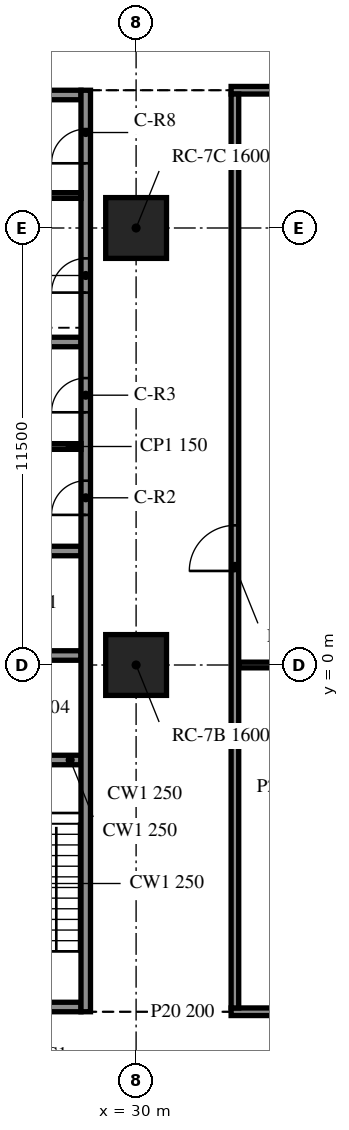
"""IFC4 building model, lengths in metres.
Left out: names, types, materials, properties, quantities, classifications, styles, units other than length and angle.
Written with IfcOpenShell. Run it as: python <this file> out.ifc"""

import sys

from ifc_helpers import new_model, si_unit, direction, frame, frame_2d, origin, origin_2d, place, context, subcontext, project, spatial, rectangle, extrude, element, fill, save


model = new_model("IFC4")
c1 = context("Model", 3, precision=1e-05, world=origin(), true_north=direction((0.0, 1.0)))
c2 = subcontext(c1, "Body", "Model", "MODEL_VIEW")
j1 = project(units=[si_unit("LENGTHUNIT", "METRE"), si_unit("PLANEANGLEUNIT", "RADIAN")], contexts=[c1])
p1 = place(None, origin())
s1 = spatial("IfcSite", under=j1, at=p1, CompositionType="ELEMENT")
p2 = place(p1, origin())
s2 = spatial("IfcBuilding", under=s1, at=p2, CompositionType="ELEMENT")
p3 = place(p2, frame((0.0, 0.0, 20.1)))
s3 = spatial("IfcBuildingStorey", under=s2, at=p3, CompositionType="ELEMENT", Elevation=20.1)
for number, where, z_axis, x_axis in (
    (1, (30.0, 0.0, -0.34), (0.0, 0.0, 1.0), (1.0, 0.0, 0.0)),
    (2, (30.0, 11.5, -0.34), (0.0, 0.0, 1.0), (1.0, 0.0, 0.0)),
):
    element("IfcColumn", number, at=place(p3, frame(where, z_axis=z_axis, x_axis=x_axis)), inside=s3, PredefinedType="COLUMN", context=c2, shape_type="SweptSolid", body=[
        extrude(rectangle(XDim=1.6, YDim=1.6, at=origin_2d()), origin(), (0.0, 0.0, 1.0), 4.3),
    ])
p4 = place(p3, frame((28.675, -9.125, 0.0), z_axis=(0.0, 0.0, 1.0), x_axis=(0.0, 1.0, 0.0)))
e3 = element("IfcWall", 3, at=p4, inside=s3, PredefinedType="SOLIDWALL", context=c2, shape_type="SweptSolid", body=[
    extrude(rectangle(XDim=24.25, YDim=0.25, at=frame_2d((12.125, 0.0))), origin(), (0.0, 0.0, 1.0), 3.96),
])
p5 = place(p4, frame((13.075, 0.0, 0.0)))
e4 = element("IfcOpeningElement", 4, at=p5, cuts=e3, PredefinedType="OPENING", context=c2, shape_type="SweptSolid", body=[
    extrude(rectangle(XDim=0.9, YDim=2.1, at=frame_2d((0.45, 1.05))), frame((0.0, 0.135, 0.0), z_axis=(0.0, -1.0, 0.0), x_axis=(1.0, 0.0, 0.0)), (0.0, 0.0, 1.0), 0.27),
])
p6 = place(p4, frame((15.775, 0.0, 0.0)))
e5 = element("IfcOpeningElement", 5, at=p6, cuts=e3, PredefinedType="OPENING", context=c2, shape_type="SweptSolid", body=[
    extrude(rectangle(XDim=0.9, YDim=2.1, at=frame_2d((0.45, 1.05))), frame((0.0, 0.135, 0.0), z_axis=(0.0, -1.0, 0.0), x_axis=(1.0, 0.0, 0.0)), (0.0, 0.0, 1.0), 0.27),
])
p7 = place(p4, frame((18.925, 0.0, 0.0)))
e6 = element("IfcOpeningElement", 6, at=p7, cuts=e3, PredefinedType="OPENING", context=c2, shape_type="SweptSolid", body=[
    extrude(rectangle(XDim=0.9, YDim=2.1, at=frame_2d((0.45, 1.05))), frame((0.0, 0.135, 0.0), z_axis=(0.0, -1.0, 0.0), x_axis=(1.0, 0.0, 0.0)), (0.0, 0.0, 1.0), 0.27),
])
p8 = place(p4, frame((22.327, 0.0, 0.0)))
e7 = element("IfcOpeningElement", 7, at=p8, cuts=e3, PredefinedType="OPENING", context=c2, shape_type="SweptSolid", body=[
    extrude(rectangle(XDim=0.9, YDim=2.1, at=frame_2d((0.45, 1.05))), frame((0.0, 0.135, 0.0), z_axis=(0.0, -1.0, 0.0), x_axis=(1.0, 0.0, 0.0)), (0.0, 0.0, 1.0), 0.27),
])
p9 = place(p3, frame((28.55, -9.0, 0.0), z_axis=(0.0, 0.0, 1.0), x_axis=(-1.0, 0.0, 0.0)))
e8 = element("IfcWall", 8, at=p9, inside=s3, PredefinedType="SOLIDWALL", context=c2, shape_type="SweptSolid", body=[
    extrude(rectangle(XDim=9.1, YDim=0.25, at=frame_2d((4.55, 0.0))), origin(), (0.0, 0.0, 1.0), 3.96),
])
p10 = place(p9, frame((3.65, 0.0, 0.0)))
e9 = element("IfcOpeningElement", 9, at=p10, cuts=e8, PredefinedType="OPENING", context=c2, shape_type="SweptSolid", body=[
    extrude(rectangle(XDim=1.8, YDim=2.1, at=frame_2d((0.9, 1.05))), frame((0.0, 0.135, 0.0), z_axis=(0.0, -1.0, 0.0), x_axis=(1.0, 0.0, 0.0)), (0.0, 0.0, 1.0), 0.27),
])
p11 = place(p3, frame((19.45, 15.0, 0.0), z_axis=(0.0, 0.0, 1.0), x_axis=(1.0, 0.0, 0.0)))
e10 = element("IfcWall", 10, at=p11, inside=s3, PredefinedType="SOLIDWALL", context=c2, shape_type="SweptSolid", body=[
    extrude(rectangle(XDim=9.1, YDim=0.25, at=frame_2d((4.55, 0.0))), origin(), (0.0, 0.0, 1.0), 3.96),
])
p12 = place(p11, frame((3.65, 0.0, 0.0)))
e11 = element("IfcOpeningElement", 11, at=p12, cuts=e10, PredefinedType="OPENING", context=c2, shape_type="SweptSolid", body=[
    extrude(rectangle(XDim=1.8, YDim=2.1, at=frame_2d((0.9, 1.05))), frame((0.0, 0.135, 0.0), z_axis=(0.0, -1.0, 0.0), x_axis=(1.0, 0.0, 0.0)), (0.0, 0.0, 1.0), 0.27),
])
for number, where, z_axis, x_axis in (
    (12, (25.7, -2.5, 0.0), (0.0, 0.0, 1.0), (1.0, 0.0, 0.0)),
    (13, (25.7, 0.25, 0.0), (0.0, 0.0, 1.0), (1.0, 0.0, 0.0)),
    (14, (25.7, 3.0, 0.0), (0.0, 0.0, 1.0), (1.0, 0.0, 0.0)),
    (15, (25.7, 8.5, 0.0), (0.0, 0.0, 1.0), (1.0, 0.0, 0.0)),
):
    element("IfcWall", number, at=place(p3, frame(where, z_axis=z_axis, x_axis=x_axis)), inside=s3, PredefinedType="SOLIDWALL", context=c2, shape_type="SweptSolid", body=[
        extrude(rectangle(XDim=2.85, YDim=0.25, at=frame_2d((1.425, 0.0))), origin(), (0.0, 0.0, 1.0), 3.96),
    ])
for number, where, z_axis, x_axis in (
    (16, (25.7, 5.75, 0.0), (0.0, 0.0, 1.0), (1.0, 0.0, 0.0)),
    (17, (25.7, 12.355, 0.0), (0.0, 0.0, 1.0), (1.0, 0.0, 0.0)),
):
    element("IfcWall", number, at=place(p3, frame(where, z_axis=z_axis, x_axis=x_axis)), inside=s3, PredefinedType="PARTITIONING", context=c2, shape_type="SweptSolid", body=[
        extrude(rectangle(XDim=2.85, YDim=0.15, at=frame_2d((1.425, 0.0))), origin(), (0.0, 0.0, 1.0), 3.96),
    ])
p13 = place(p3, frame((32.5, -9.125, 0.0), z_axis=(0.0, 0.0, 1.0), x_axis=(1.0, 0.0, 0.0)))
e18 = element("IfcWall", 18, at=p13, inside=s3, PredefinedType="PARTITIONING", context=c2, shape_type="SweptSolid", body=[
    extrude(rectangle(XDim=13.45, YDim=0.2, at=frame_2d((6.725, 0.0))), origin(), (0.0, 0.0, 1.0), 3.96),
])
p14 = place(p13, frame((5.1, 0.0, 0.0)))
e19 = element("IfcOpeningElement", 19, at=p14, cuts=e18, PredefinedType="OPENING", context=c2, shape_type="SweptSolid", body=[
    extrude(rectangle(XDim=1.2, YDim=2.1, at=frame_2d((0.6, 1.05))), frame((0.0, 0.11, 0.0), z_axis=(0.0, -1.0, 0.0), x_axis=(1.0, 0.0, 0.0)), (0.0, 0.0, 1.0), 0.22),
])
p15 = place(p13, frame((6.9, 0.0, 0.0)))
e20 = element("IfcOpeningElement", 20, at=p15, cuts=e18, PredefinedType="OPENING", context=c2, shape_type="SweptSolid", body=[
    extrude(rectangle(XDim=1.2, YDim=2.1, at=frame_2d((0.6, 1.05))), frame((0.0, 0.11, 0.0), z_axis=(0.0, -1.0, 0.0), x_axis=(1.0, 0.0, 0.0)), (0.0, 0.0, 1.0), 0.22),
])
p16 = place(p3, frame((32.7, 0.0, 0.0), z_axis=(0.0, 0.0, 1.0), x_axis=(1.0, 0.0, 0.0)))
e21 = element("IfcWall", 21, at=p16, inside=s3, PredefinedType="PARTITIONING", context=c2, shape_type="SweptSolid", body=[
    extrude(rectangle(XDim=8.5, YDim=0.15, at=frame_2d((4.25, 0.0))), origin(), (0.0, 0.0, 1.0), 3.96),
])
p17 = place(p3, frame((32.5, 15.125, 0.0), z_axis=(0.0, 0.0, 1.0), x_axis=(1.0, 0.0, 0.0)))
e22 = element("IfcWall", 22, at=p17, inside=s3, PredefinedType="PARTITIONING", context=c2, shape_type="SweptSolid", body=[
    extrude(rectangle(XDim=13.45, YDim=0.2, at=frame_2d((6.725, 0.0))), origin(), (0.0, 0.0, 1.0), 3.96),
])
p18 = place(p3, frame((32.6, -9.025, 0.0), z_axis=(0.0, 0.0, 1.0), x_axis=(0.0, 1.0, 0.0)))
e23 = element("IfcWall", 23, at=p18, inside=s3, PredefinedType="PARTITIONING", context=c2, shape_type="SweptSolid", body=[
    extrude(rectangle(XDim=24.05, YDim=0.2, at=frame_2d((12.025, 0.0))), origin(), (0.0, 0.0, 1.0), 3.96),
])
p19 = place(p18, frame((11.5, 0.0, 0.0)))
e24 = element("IfcOpeningElement", 24, at=p19, cuts=e23, PredefinedType="OPENING", context=c2, shape_type="SweptSolid", body=[
    extrude(rectangle(XDim=1.2, YDim=2.1, at=frame_2d((0.6, 1.05))), frame((0.0, 0.11, 0.0), z_axis=(0.0, -1.0, 0.0), x_axis=(1.0, 0.0, 0.0)), (0.0, 0.0, 1.0), 0.22),
])
p20 = place(p5, origin())
e25 = element("IfcDoor", 25, at=p20, inside=s3, OperationType="SINGLE_SWING_RIGHT", PredefinedType="DOOR", context=c2, shape_type="SweptSolid", body=[
    extrude(rectangle(XDim=0.9, YDim=2.1, at=frame_2d((0.45, 1.05))), frame((0.0, 0.025, 0.0), z_axis=(0.0, -1.0, 0.0), x_axis=(1.0, 0.0, 0.0)), (0.0, 0.0, 1.0), 0.05),
])
fill(e4, e25)
p21 = place(p6, origin())
e26 = element("IfcDoor", 26, at=p21, inside=s3, OperationType="SINGLE_SWING_LEFT", PredefinedType="DOOR", context=c2, shape_type="SweptSolid", body=[
    extrude(rectangle(XDim=0.9, YDim=2.1, at=frame_2d((0.45, 1.05))), frame((0.0, 0.025, 0.0), z_axis=(0.0, -1.0, 0.0), x_axis=(1.0, 0.0, 0.0)), (0.0, 0.0, 1.0), 0.05),
])
fill(e5, e26)
p22 = place(p7, origin())
e27 = element("IfcDoor", 27, at=p22, inside=s3, OperationType="SINGLE_SWING_LEFT", PredefinedType="DOOR", context=c2, shape_type="SweptSolid", body=[
    extrude(rectangle(XDim=0.9, YDim=2.1, at=frame_2d((0.45, 1.05))), frame((0.0, 0.025, 0.0), z_axis=(0.0, -1.0, 0.0), x_axis=(1.0, 0.0, 0.0)), (0.0, 0.0, 1.0), 0.05),
])
fill(e6, e27)
p23 = place(p8, origin())
e28 = element("IfcDoor", 28, at=p23, inside=s3, OperationType="SINGLE_SWING_RIGHT", PredefinedType="DOOR", context=c2, shape_type="SweptSolid", body=[
    extrude(rectangle(XDim=0.9, YDim=2.1, at=frame_2d((0.45, 1.05))), frame((0.0, 0.025, 0.0), z_axis=(0.0, -1.0, 0.0), x_axis=(1.0, 0.0, 0.0)), (0.0, 0.0, 1.0), 0.05),
])
fill(e7, e28)
p24 = place(p19, origin())
e29 = element("IfcDoor", 29, at=p24, inside=s3, OperationType="SINGLE_SWING_LEFT", PredefinedType="DOOR", context=c2, shape_type="SweptSolid", body=[
    extrude(rectangle(XDim=1.2, YDim=2.1, at=frame_2d((0.6, 1.05))), frame((0.0, 0.025, 0.0), z_axis=(0.0, -1.0, 0.0), x_axis=(1.0, 0.0, 0.0)), (0.0, 0.0, 1.0), 0.05),
])
fill(e24, e29)
save(model, sys.argv[1])
